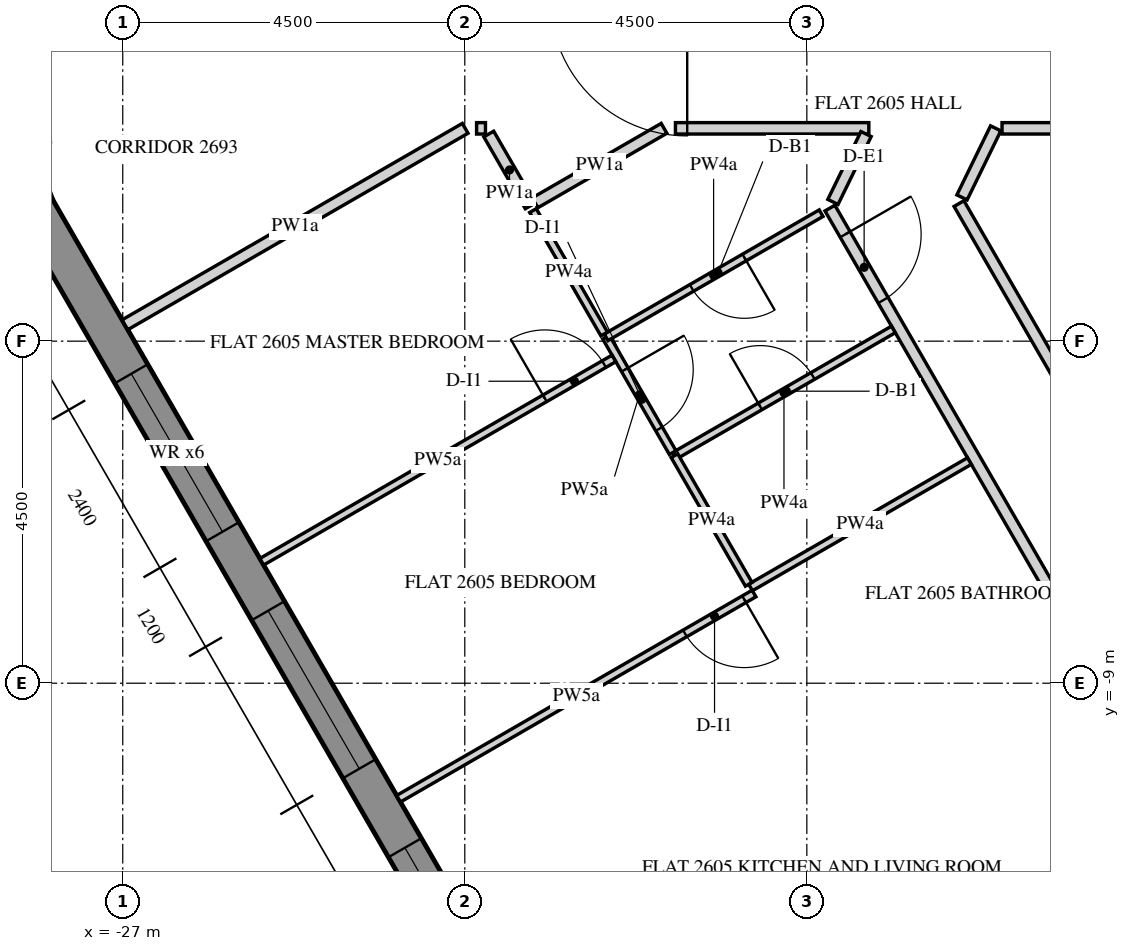
"""IFC4 building model, lengths in metres.
Left out: names, types, materials, properties, quantities, classifications, styles, units other than length and angle.
Written with IfcOpenShell. Run it as: python <this file> out.ifc"""

import sys

from ifc_helpers import new_model, si_unit, direction, frame, frame_2d, origin, place, context, subcontext, project, spatial, polyline, rectangle, outline, extrude, element, fill, save


model = new_model("IFC4")
c1 = context("Model", 3, precision=1e-05, world=origin(), true_north=direction((0.0, 1.0)))
c2 = subcontext(c1, "Body", "Model", "MODEL_VIEW")
j1 = project(units=[si_unit("LENGTHUNIT", "METRE"), si_unit("PLANEANGLEUNIT", "RADIAN")], contexts=[c1])
p1 = place(None, origin())
s1 = spatial("IfcSite", under=j1, at=p1, CompositionType="ELEMENT")
p2 = place(p1, origin())
s2 = spatial("IfcBuilding", under=s1, at=p2, CompositionType="ELEMENT")
p3 = place(p2, frame((0.0, 0.0, 334.2)))
s3 = spatial("IfcBuildingStorey", under=s2, at=p3, CompositionType="ELEMENT", Elevation=334.2)
p4 = place(p3, frame((-28.578, -1.606, -0.15), z_axis=(0.0, 0.0, 1.0), x_axis=(0.352838463023, -0.935684251771, 0.0)))
e1 = element("IfcWall", 1, at=p4, inside=s3, PredefinedType="SOLIDWALL", context=c2, shape_type="SweptSolid", body=[
    extrude(outline(polyline([(-0.041, -0.25), (1.237, -0.25), (1.196, 0.25), (0.041, 0.25), (-0.041, -0.25)])), origin(), (0.0, 0.0, 1.0), 3.75),
])
p5 = place(p3, frame((-28.149, -2.745, -0.15), z_axis=(0.0, 0.0, 1.0), x_axis=(0.500003737743, -0.866023245787, 0.0)))
e2 = element("IfcWall", 2, at=p5, inside=s3, PredefinedType="SOLIDWALL", context=c2, shape_type="SweptSolid", body=[
    extrude(outline(polyline([(-0.021, -0.25), (25.468, -0.25), (25.421, 0.25), (0.021, 0.25), (-0.021, -0.25)])), origin(), (0.0, 0.0, 1.0), 3.75),
])
p6 = place(p5, frame((2.522, 0.0, 0.75)))
e3 = element("IfcOpeningElement", 3, at=p6, cuts=e2, PredefinedType="OPENING", context=c2, shape_type="SweptSolid", body=[
    extrude(rectangle(XDim=2.4, YDim=2.7, at=frame_2d((1.2, 1.35))), frame((0.0, 0.26, 0.0), z_axis=(0.0, -1.0, 0.0), x_axis=(1.0, 0.0, 0.0)), (0.0, 0.0, 1.0), 0.52),
])
p7 = place(p5, frame((6.122, 0.0, 0.75)))
e4 = element("IfcOpeningElement", 4, at=p7, cuts=e2, PredefinedType="OPENING", context=c2, shape_type="SweptSolid", body=[
    extrude(rectangle(XDim=2.4, YDim=2.7, at=frame_2d((1.2, 1.35))), frame((0.0, 0.26, 0.0), z_axis=(0.0, -1.0, 0.0), x_axis=(1.0, 0.0, 0.0)), (0.0, 0.0, 1.0), 0.52),
])
p8 = place(p5, frame((9.722, 0.0, 0.75)))
e5 = element("IfcOpeningElement", 5, at=p8, cuts=e2, PredefinedType="OPENING", context=c2, shape_type="SweptSolid", body=[
    extrude(rectangle(XDim=2.4, YDim=2.7, at=frame_2d((1.2, 1.35))), frame((0.0, 0.26, 0.0), z_axis=(0.0, -1.0, 0.0), x_axis=(1.0, 0.0, 0.0)), (0.0, 0.0, 1.0), 0.52),
])
p9 = place(p5, frame((13.323, 0.0, 0.75)))
e6 = element("IfcOpeningElement", 6, at=p9, cuts=e2, PredefinedType="OPENING", context=c2, shape_type="SweptSolid", body=[
    extrude(rectangle(XDim=2.4, YDim=2.7, at=frame_2d((1.2, 1.35))), frame((0.0, 0.26, 0.0), z_axis=(0.0, -1.0, 0.0), x_axis=(1.0, 0.0, 0.0)), (0.0, 0.0, 1.0), 0.52),
])
p10 = place(p5, frame((16.922, 0.0, 0.75)))
e7 = element("IfcOpeningElement", 7, at=p10, cuts=e2, PredefinedType="OPENING", context=c2, shape_type="SweptSolid", body=[
    extrude(rectangle(XDim=2.4, YDim=2.7, at=frame_2d((1.2, 1.35))), frame((0.0, 0.26, 0.0), z_axis=(0.0, -1.0, 0.0), x_axis=(1.0, 0.0, 0.0)), (0.0, 0.0, 1.0), 0.52),
])
p11 = place(p5, frame((20.522, 0.0, 0.75)))
e8 = element("IfcOpeningElement", 8, at=p11, cuts=e2, PredefinedType="OPENING", context=c2, shape_type="SweptSolid", body=[
    extrude(rectangle(XDim=2.4, YDim=2.7, at=frame_2d((1.2, 1.35))), frame((0.0, 0.26, 0.0), z_axis=(0.0, -1.0, 0.0), x_axis=(1.0, 0.0, 0.0)), (0.0, 0.0, 1.0), 0.52),
])
p12 = place(p3, frame((-17.696, -2.749, 0.0), z_axis=(0.0, 0.0, 1.0), x_axis=(0.499997948852, -0.866026588012, 0.0)))
e9 = element("IfcWall", 9, at=p12, inside=s3, PredefinedType="PARTITIONING", context=c2, shape_type="SweptSolid", body=[
    extrude(rectangle(XDim=14.677, YDim=0.15, at=frame_2d((7.339, 0.0))), origin(), (0.0, 0.0, 1.0), 2.838),
])
p13 = place(p12, frame((0.4, 0.0, 0.0)))
e10 = element("IfcOpeningElement", 10, at=p13, cuts=e9, PredefinedType="OPENING", context=c2, shape_type="SweptSolid", body=[
    extrude(rectangle(XDim=1.0, YDim=2.1, at=frame_2d((0.5, 1.05))), frame((0.0, 0.085, 0.0), z_axis=(0.0, -1.0, 0.0), x_axis=(1.0, 0.0, 0.0)), (0.0, 0.0, 1.0), 0.17),
])
p14 = place(p12, frame((13.527, 0.0, 0.0)))
e11 = element("IfcOpeningElement", 11, at=p14, cuts=e9, PredefinedType="OPENING", context=c2, shape_type="SweptSolid", body=[
    extrude(rectangle(XDim=1.0, YDim=2.1, at=frame_2d((0.5, 1.05))), frame((0.0, 0.085, 0.0), z_axis=(0.0, -1.0, 0.0), x_axis=(1.0, 0.0, 0.0)), (0.0, 0.0, 1.0), 0.17),
])
p15 = place(p3, frame((-26.971, -4.284, 0.0), z_axis=(0.0, 0.0, 1.0), x_axis=(0.866019619451, 0.500010018626, 0.0)))
e12 = element("IfcWall", 12, at=p15, inside=s3, PredefinedType="PARTITIONING", context=c2, shape_type="SweptSolid", body=[
    extrude(rectangle(XDim=5.169, YDim=0.15, at=frame_2d((2.584, 0.0))), origin(), (0.0, 0.0, 1.0), 2.838),
])
p16 = place(p3, frame((-22.345, -1.7, 0.0), z_axis=(0.0, 0.0, 1.0), x_axis=(1.0, 0.0, 0.0)))
e13 = element("IfcWall", 13, at=p16, inside=s3, PredefinedType="PARTITIONING", context=c2, shape_type="SweptSolid", body=[
    extrude(rectangle(XDim=0.117, YDim=0.15, at=frame_2d((0.059, 0.0))), origin(), (0.0, 0.0, 1.0), 2.838),
])
p17 = place(p3, frame((-22.185, -1.775, 0.0), z_axis=(0.0, 0.0, 1.0), x_axis=(0.499819250349, -0.866129734497, 0.0)))
e14 = element("IfcWall", 14, at=p17, inside=s3, PredefinedType="PARTITIONING", context=c2, shape_type="SweptSolid", body=[
    extrude(rectangle(XDim=1.092, YDim=0.15, at=frame_2d((0.546, 0.0))), origin(), (0.0, 0.0, 1.0), 2.838),
])
p18 = place(p3, frame((-21.576, -2.68, 0.0), z_axis=(0.0, 0.0, 1.0), x_axis=(0.866034128446, 0.499984888139, 0.0)))
e15 = element("IfcWall", 15, at=p18, inside=s3, PredefinedType="PARTITIONING", context=c2, shape_type="SweptSolid", body=[
    extrude(rectangle(XDim=1.959, YDim=0.15, at=frame_2d((0.98, 0.0))), origin(), (0.0, 0.0, 1.0), 2.838),
])
p19 = place(p3, frame((-19.729, -1.7, 0.0), z_axis=(0.0, 0.0, 1.0), x_axis=(1.0, 0.0, 0.0)))
e16 = element("IfcWall", 16, at=p19, inside=s3, PredefinedType="PARTITIONING", context=c2, shape_type="SweptSolid", body=[
    extrude(rectangle(XDim=2.544, YDim=0.15, at=frame_2d((1.272, 0.0))), origin(), (0.0, 0.0, 1.0), 2.838),
])
p20 = place(p3, frame((-17.221, -1.775, 0.0), z_axis=(0.0, 0.0, 1.0), x_axis=(-0.43834617456, -0.89880622564, 0.0)))
e17 = element("IfcWall", 17, at=p20, inside=s3, PredefinedType="PARTITIONING", context=c2, shape_type="SweptSolid", body=[
    extrude(rectangle(XDim=0.994, YDim=0.15, at=frame_2d((0.497, 0.0))), origin(), (0.0, 0.0, 1.0), 2.838),
])
p21 = place(p3, frame((-13.74, -6.601, 0.0), z_axis=(0.0, 0.0, 1.0), x_axis=(-0.499976727135, 0.866038839962, 0.0)))
e18 = element("IfcWall", 18, at=p21, inside=s3, PredefinedType="PARTITIONING", context=c2, shape_type="SweptSolid", body=[
    extrude(rectangle(XDim=4.516, YDim=0.15, at=frame_2d((2.258, 0.0))), origin(), (0.0, 0.0, 1.0), 2.838),
])
p22 = place(p3, frame((-15.959, -2.609, 0.0), z_axis=(0.0, 0.0, 1.0), x_axis=(0.43849974808, 0.898731311869, 0.0)))
e19 = element("IfcWall", 19, at=p22, inside=s3, PredefinedType="PARTITIONING", context=c2, shape_type="SweptSolid", body=[
    extrude(rectangle(XDim=1.011, YDim=0.15, at=frame_2d((0.505, 0.0))), origin(), (0.0, 0.0, 1.0), 2.838),
])
p23 = place(p3, frame((-15.432, -1.7, 0.0), z_axis=(0.0, 0.0, 1.0), x_axis=(1.0, 0.0, 0.0)))
e20 = element("IfcWall", 20, at=p23, inside=s3, PredefinedType="PARTITIONING", context=c2, shape_type="SweptSolid", body=[
    extrude(rectangle(XDim=0.946, YDim=0.15, at=frame_2d((0.473, 0.0))), origin(), (0.0, 0.0, 1.0), 2.838),
])
p24 = place(p3, frame((-15.861, -6.078, 0.0), z_axis=(0.0, 0.0, 1.0), x_axis=(-0.866020521143, -0.500008456887, 0.0)))
e21 = element("IfcWall", 21, at=p24, inside=s3, PredefinedType="PARTITIONING", context=c2, shape_type="SweptSolid", body=[
    extrude(rectangle(XDim=3.325, YDim=0.1, at=frame_2d((1.663, 0.0))), origin(), (0.0, 0.0, 1.0), 2.838),
])
p25 = place(p3, frame((-18.695, -7.82, 0.0), z_axis=(0.0, 0.0, 1.0), x_axis=(-0.866028230842, -0.499995103361, 0.0)))
e22 = element("IfcWall", 22, at=p25, inside=s3, PredefinedType="PARTITIONING", context=c2, shape_type="SweptSolid", body=[
    extrude(rectangle(XDim=5.4, YDim=0.1, at=frame_2d((2.7, 0.0))), origin(), (0.0, 0.0, 1.0), 2.838),
])
p26 = place(p25, frame((0.15, 0.0, 0.0)))
e23 = element("IfcOpeningElement", 23, at=p26, cuts=e22, PredefinedType="OPENING", context=c2, shape_type="SweptSolid", body=[
    extrude(rectangle(XDim=0.9, YDim=2.1, at=frame_2d((0.45, 1.05))), frame((0.0, 0.06, 0.0), z_axis=(0.0, -1.0, 0.0), x_axis=(1.0, 0.0, 0.0)), (0.0, 0.0, 1.0), 0.12),
])
p27 = place(p3, frame((-19.741, -6.008, 0.0), z_axis=(0.0, 0.0, 1.0), x_axis=(0.866052313871, 0.499953387465, 0.0)))
e24 = element("IfcWall", 24, at=p27, inside=s3, PredefinedType="PARTITIONING", context=c2, shape_type="SweptSolid", body=[
    extrude(rectangle(XDim=3.325, YDim=0.1, at=frame_2d((1.663, 0.0))), origin(), (0.0, 0.0, 1.0), 2.838),
])
p28 = place(p27, frame((1.3, 0.0, 0.0)))
e25 = element("IfcOpeningElement", 25, at=p28, cuts=e24, PredefinedType="OPENING", context=c2, shape_type="SweptSolid", body=[
    extrude(rectangle(XDim=0.8, YDim=2.1, at=frame_2d((0.4, 1.05))), frame((0.0, 0.06, 0.0), z_axis=(0.0, -1.0, 0.0), x_axis=(1.0, 0.0, 0.0)), (0.0, 0.0, 1.0), 0.12),
])
p29 = place(p3, frame((-20.642, -4.448, 0.0), z_axis=(0.0, 0.0, 1.0), x_axis=(0.499971461383, -0.866041879935, 0.0)))
e26 = element("IfcWall", 26, at=p29, inside=s3, PredefinedType="PARTITIONING", context=c2, shape_type="SweptSolid", body=[
    extrude(rectangle(XDim=1.754, YDim=0.1, at=frame_2d((0.877, 0.0))), origin(), (0.0, 0.0, 1.0), 2.838),
])
p30 = place(p29, frame((0.494, 0.0, 0.0)))
e27 = element("IfcOpeningElement", 27, at=p30, cuts=e26, PredefinedType="OPENING", context=c2, shape_type="SweptSolid", body=[
    extrude(rectangle(XDim=0.9, YDim=2.1, at=frame_2d((0.45, 1.05))), frame((0.0, 0.06, 0.0), z_axis=(0.0, -1.0, 0.0), x_axis=(1.0, 0.0, 0.0)), (0.0, 0.0, 1.0), 0.12),
])
p31 = place(p3, frame((-17.812, -2.816, 0.0), z_axis=(0.0, 0.0, 1.0), x_axis=(-0.866044918084, -0.499966198718, 0.0)))
e28 = element("IfcWall", 28, at=p31, inside=s3, PredefinedType="PARTITIONING", context=c2, shape_type="SweptSolid", body=[
    extrude(rectangle(XDim=3.266, YDim=0.1, at=frame_2d((1.633, 0.0))), origin(), (0.0, 0.0, 1.0), 2.838),
])
p32 = place(p31, frame((1.166, 0.0, 0.0)))
e29 = element("IfcOpeningElement", 29, at=p32, cuts=e28, PredefinedType="OPENING", context=c2, shape_type="SweptSolid", body=[
    extrude(rectangle(XDim=0.8, YDim=2.1, at=frame_2d((0.4, 1.05))), frame((0.0, 0.06, 0.0), z_axis=(0.0, -1.0, 0.0), x_axis=(1.0, 0.0, 0.0)), (0.0, 0.0, 1.0), 0.12),
])
p33 = place(p3, frame((-19.742, -6.006, 0.0), z_axis=(0.0, 0.0, 1.0), x_axis=(0.499982003349, -0.866035793907, 0.0)))
e30 = element("IfcWall", 30, at=p33, inside=s3, PredefinedType="PARTITIONING", context=c2, shape_type="SweptSolid", body=[
    extrude(rectangle(XDim=1.954, YDim=0.1, at=frame_2d((0.977, 0.0))), origin(), (0.0, 0.0, 1.0), 2.838),
])
p34 = place(p3, frame((-25.171, -7.402, 0.0), z_axis=(0.0, 0.0, 1.0), x_axis=(0.866013074135, 0.500021354972, 0.0)))
e31 = element("IfcWall", 31, at=p34, inside=s3, PredefinedType="PARTITIONING", context=c2, shape_type="SweptSolid", body=[
    extrude(rectangle(XDim=5.35, YDim=0.1, at=frame_2d((2.675, 0.0))), origin(), (0.0, 0.0, 1.0), 2.838),
])
p35 = place(p34, frame((4.3, 0.0, 0.0)))
e32 = element("IfcOpeningElement", 32, at=p35, cuts=e31, PredefinedType="OPENING", context=c2, shape_type="SweptSolid", body=[
    extrude(rectangle(XDim=0.9, YDim=2.1, at=frame_2d((0.45, 1.05))), frame((0.0, 0.06, 0.0), z_axis=(0.0, -1.0, 0.0), x_axis=(1.0, 0.0, 0.0)), (0.0, 0.0, 1.0), 0.12),
])
p36 = place(p3, frame((-20.666, -4.406, 0.0), z_axis=(0.0, 0.0, 1.0), x_axis=(-0.500004234368, 0.866022959057, 0.0)))
e33 = element("IfcWall", 33, at=p36, inside=s3, PredefinedType="PARTITIONING", context=c2, shape_type="SweptSolid", body=[
    extrude(rectangle(XDim=1.875, YDim=0.1, at=frame_2d((0.938, 0.0))), origin(), (0.0, 0.0, 1.0), 2.838),
])
p37 = place(p6, frame((0.0, 0.18, 0.0)))
e34 = element("IfcWindow", 34, at=p37, inside=s3, PartitioningType="DOUBLE_PANEL_VERTICAL", PredefinedType="WINDOW", context=c2, shape_type="SweptSolid", body=[
    extrude(rectangle(XDim=2.4, YDim=2.7, at=frame_2d((1.2, 1.35))), frame((0.0, 0.03, 0.0), z_axis=(0.0, -1.0, 0.0), x_axis=(1.0, 0.0, 0.0)), (0.0, 0.0, 1.0), 0.06),
])
fill(e3, e34)
p38 = place(p7, frame((0.0, 0.18, 0.0)))
e35 = element("IfcWindow", 35, at=p38, inside=s3, PartitioningType="DOUBLE_PANEL_VERTICAL", PredefinedType="WINDOW", context=c2, shape_type="SweptSolid", body=[
    extrude(rectangle(XDim=2.4, YDim=2.7, at=frame_2d((1.2, 1.35))), frame((0.0, 0.03, 0.0), z_axis=(0.0, -1.0, 0.0), x_axis=(1.0, 0.0, 0.0)), (0.0, 0.0, 1.0), 0.06),
])
fill(e4, e35)
p39 = place(p8, frame((0.0, 0.18, 0.0)))
e36 = element("IfcWindow", 36, at=p39, inside=s3, PartitioningType="DOUBLE_PANEL_VERTICAL", PredefinedType="WINDOW", context=c2, shape_type="SweptSolid", body=[
    extrude(rectangle(XDim=2.4, YDim=2.7, at=frame_2d((1.2, 1.35))), frame((0.0, 0.03, 0.0), z_axis=(0.0, -1.0, 0.0), x_axis=(1.0, 0.0, 0.0)), (0.0, 0.0, 1.0), 0.06),
])
fill(e5, e36)
p40 = place(p13, origin())
e37 = element("IfcDoor", 37, at=p40, inside=s3, OperationType="SINGLE_SWING_RIGHT", PredefinedType="DOOR", context=c2, shape_type="SweptSolid", body=[
    extrude(rectangle(XDim=1.0, YDim=2.1, at=frame_2d((0.5, 1.05))), frame((0.0, 0.025, 0.0), z_axis=(0.0, -1.0, 0.0), x_axis=(1.0, 0.0, 0.0)), (0.0, 0.0, 1.0), 0.05),
])
fill(e10, e37)
p41 = place(p28, origin())
e38 = element("IfcDoor", 38, at=p41, inside=s3, OperationType="SINGLE_SWING_LEFT", PredefinedType="DOOR", context=c2, shape_type="SweptSolid", body=[
    extrude(rectangle(XDim=0.8, YDim=2.1, at=frame_2d((0.4, 1.05))), frame((0.0, 0.025, 0.0), z_axis=(0.0, -1.0, 0.0), x_axis=(1.0, 0.0, 0.0)), (0.0, 0.0, 1.0), 0.05),
])
fill(e25, e38)
p42 = place(p30, origin())
e39 = element("IfcDoor", 39, at=p42, inside=s3, OperationType="SINGLE_SWING_RIGHT", PredefinedType="DOOR", context=c2, shape_type="SweptSolid", body=[
    extrude(rectangle(XDim=0.9, YDim=2.1, at=frame_2d((0.45, 1.05))), frame((0.0, 0.025, 0.0), z_axis=(0.0, -1.0, 0.0), x_axis=(1.0, 0.0, 0.0)), (0.0, 0.0, 1.0), 0.05),
])
fill(e27, e39)
p43 = place(p35, origin())
e40 = element("IfcDoor", 40, at=p43, inside=s3, OperationType="SINGLE_SWING_RIGHT", PredefinedType="DOOR", context=c2, shape_type="SweptSolid", body=[
    extrude(rectangle(XDim=0.9, YDim=2.1, at=frame_2d((0.45, 1.05))), frame((0.0, 0.025, 0.0), z_axis=(0.0, -1.0, 0.0), x_axis=(1.0, 0.0, 0.0)), (0.0, 0.0, 1.0), 0.05),
])
fill(e32, e40)
p44 = place(p26, origin())
e41 = element("IfcDoor", 41, at=p44, inside=s3, OperationType="SINGLE_SWING_RIGHT", PredefinedType="DOOR", context=c2, shape_type="SweptSolid", body=[
    extrude(rectangle(XDim=0.9, YDim=2.1, at=frame_2d((0.45, 1.05))), frame((0.0, 0.025, 0.0), z_axis=(0.0, -1.0, 0.0), x_axis=(1.0, 0.0, 0.0)), (0.0, 0.0, 1.0), 0.05),
])
fill(e23, e41)
p45 = place(p32, origin())
e42 = element("IfcDoor", 42, at=p45, inside=s3, OperationType="SINGLE_SWING_RIGHT", PredefinedType="DOOR", context=c2, shape_type="SweptSolid", body=[
    extrude(rectangle(XDim=0.8, YDim=2.1, at=frame_2d((0.4, 1.05))), frame((0.0, 0.025, 0.0), z_axis=(0.0, -1.0, 0.0), x_axis=(1.0, 0.0, 0.0)), (0.0, 0.0, 1.0), 0.05),
])
fill(e29, e42)
save(model, sys.argv[1])
